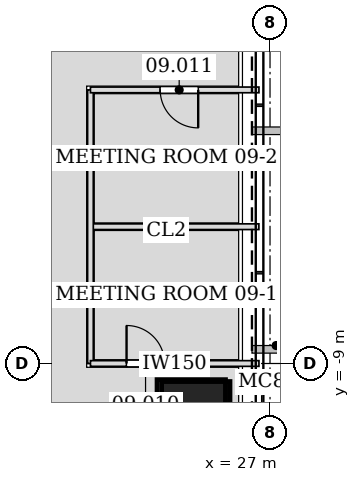
"""IFC4 building model, lengths in metres.
Left out: names, types, materials, properties, quantities, classifications, styles, units other than length and angle.
Written with IfcOpenShell. Run it as: python <this file> out.ifc"""

import sys

from ifc_helpers import new_model, si_unit, direction, frame, frame_2d, origin, origin_2d, place, context, subcontext, project, spatial, rectangle, hollow_rectangle, extrude, element, fill, save


model = new_model("IFC4")
c1 = context("Model", 3, precision=1e-05, world=origin(), true_north=direction((0.0, 1.0)))
c2 = subcontext(c1, "Body", "Model", "MODEL_VIEW")
j1 = project(units=[si_unit("LENGTHUNIT", "METRE"), si_unit("PLANEANGLEUNIT", "RADIAN")], contexts=[c1])
p1 = place(None, origin())
s1 = spatial("IfcSite", under=j1, at=p1, CompositionType="ELEMENT")
p2 = place(p1, origin())
s2 = spatial("IfcBuilding", under=s1, at=p2, CompositionType="ELEMENT")
p3 = place(p2, frame((0.0, 0.0, 45.6)))
s3 = spatial("IfcBuildingStorey", under=s2, at=p3, CompositionType="ELEMENT", Elevation=45.6)
p4 = place(p3, frame((25.047, -10.375, 0.0), z_axis=(-0.028295749455, 0.011678533143, 0.999531371407), x_axis=(-0.38151339852, -0.924363308851, 0.0)))
e1 = element("IfcColumn", 1, at=p4, inside=s3, PredefinedType="COLUMN", context=c2, shape_type="SweptSolid", body=[
    extrude(hollow_rectangle(XDim=1.8, YDim=1.8, WallThickness=0.085, at=origin_2d()), origin(), (0.0, 0.0, 1.0), 4.202),
])
p5 = place(p3, frame((26.707, -5.4, 0.0), z_axis=(0.0, 0.0, 1.0), x_axis=(-1.0, 0.0, 0.0)))
e2 = element("IfcWall", 2, at=p5, inside=s3, PredefinedType="PARTITIONING", context=c2, shape_type="SweptSolid", body=[
    extrude(rectangle(XDim=4.432, YDim=0.15, at=frame_2d((2.216, 0.0))), origin(), (0.0, 0.0, 1.0), 3.423),
])
p6 = place(p3, frame((22.275, -9.0, 0.0), z_axis=(0.0, 0.0, 1.0), x_axis=(0.0, 1.0, 0.0)))
e3 = element("IfcWall", 3, at=p6, inside=s3, PredefinedType="PARTITIONING", context=c2, shape_type="SweptSolid", body=[
    extrude(rectangle(XDim=7.2, YDim=0.15, at=frame_2d((3.6, 0.0))), origin(), (0.0, 0.0, 1.0), 4.035),
])
p7 = place(p3, frame((22.275, -9.0, 0.0), z_axis=(0.0, 0.0, 1.0), x_axis=(1.0, 0.0, 0.0)))
e4 = element("IfcWall", 4, at=p7, inside=s3, PredefinedType="PARTITIONING", context=c2, shape_type="SweptSolid", body=[
    extrude(rectangle(XDim=4.434, YDim=0.15, at=frame_2d((2.217, 0.0))), origin(), (0.0, 0.0, 1.0), 3.423),
])
p8 = place(p7, frame((0.95, 0.0, 0.0)))
e5 = element("IfcOpeningElement", 5, at=p8, cuts=e4, PredefinedType="OPENING", context=c2, shape_type="SweptSolid", body=[
    extrude(rectangle(XDim=1.0, YDim=2.1, at=frame_2d((0.5, 1.05))), frame((0.0, 0.085, 0.0), z_axis=(0.0, -1.0, 0.0), x_axis=(1.0, 0.0, 0.0)), (0.0, 0.0, 1.0), 0.17),
])
p9 = place(p3, frame((26.709, -1.8, 0.0), z_axis=(0.0, 0.0, 1.0), x_axis=(-1.0, 0.0, 0.0)))
e6 = element("IfcWall", 6, at=p9, inside=s3, PredefinedType="PARTITIONING", context=c2, shape_type="SweptSolid", body=[
    extrude(rectangle(XDim=4.434, YDim=0.15, at=frame_2d((2.217, 0.0))), origin(), (0.0, 0.0, 1.0), 3.423),
])
p10 = place(p9, frame((1.599, 0.0, 0.0)))
e7 = element("IfcOpeningElement", 7, at=p10, cuts=e6, PredefinedType="OPENING", context=c2, shape_type="SweptSolid", body=[
    extrude(rectangle(XDim=1.0, YDim=2.1, at=frame_2d((0.5, 1.05))), frame((0.0, 0.085, 0.0), z_axis=(0.0, -1.0, 0.0), x_axis=(1.0, 0.0, 0.0)), (0.0, 0.0, 1.0), 0.17),
])
p11 = place(p8, origin())
e8 = element("IfcDoor", 8, at=p11, inside=s3, OperationType="SINGLE_SWING_LEFT", PredefinedType="DOOR", context=c2, shape_type="SweptSolid", body=[
    extrude(rectangle(XDim=1.0, YDim=2.1, at=frame_2d((0.5, 1.05))), frame((0.0, 0.025, 0.0), z_axis=(0.0, -1.0, 0.0), x_axis=(1.0, 0.0, 0.0)), (0.0, 0.0, 1.0), 0.05),
])
fill(e5, e8)
p12 = place(p10, origin())
e9 = element("IfcDoor", 9, at=p12, inside=s3, OperationType="SINGLE_SWING_LEFT", PredefinedType="DOOR", context=c2, shape_type="SweptSolid", body=[
    extrude(rectangle(XDim=1.0, YDim=2.1, at=frame_2d((0.5, 1.05))), frame((0.0, 0.025, 0.0), z_axis=(0.0, -1.0, 0.0), x_axis=(1.0, 0.0, 0.0)), (0.0, 0.0, 1.0), 0.05),
])
fill(e7, e9)
save(model, sys.argv[1])
